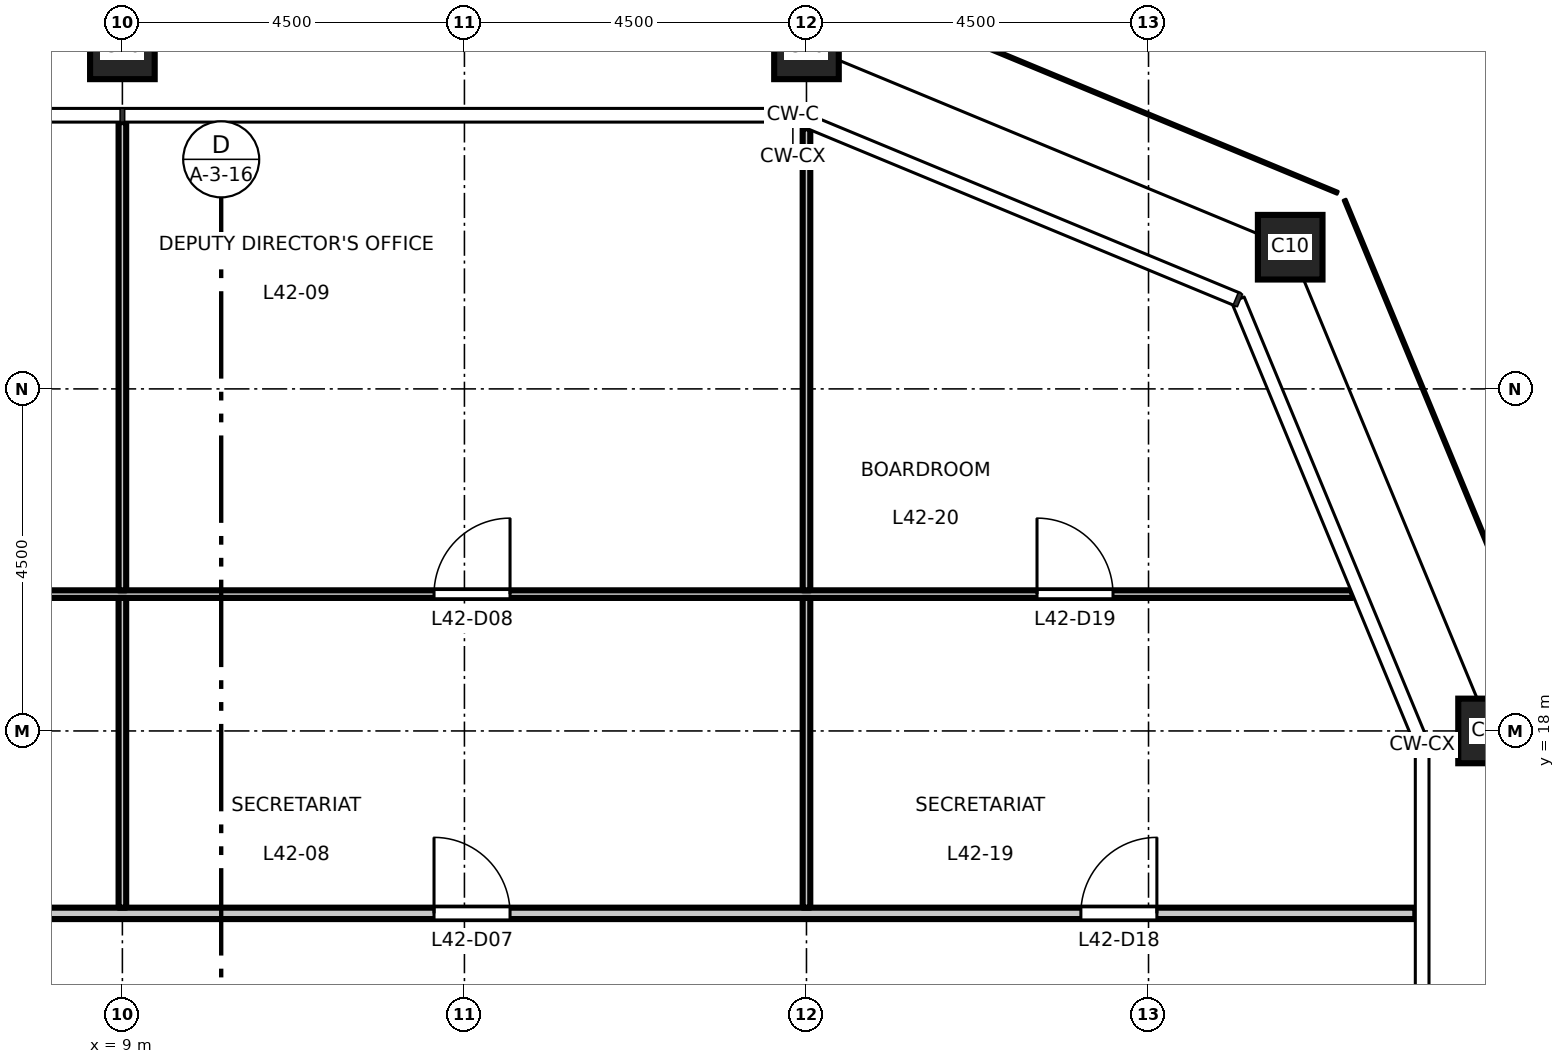
"""IFC4 building model, lengths in metres.
Left out: names, types, materials, properties, quantities, classifications, styles, units other than length and angle.
Written with IfcOpenShell. Run it as: python <this file> out.ifc"""

import sys

from ifc_helpers import new_model, si_unit, direction, frame, frame_2d, origin, origin_2d, place, context, subcontext, project, spatial, rectangle, hollow_rectangle, extrude, element, fill, save


model = new_model("IFC4")
c1 = context("Model", 3, precision=1e-05, world=origin(), true_north=direction((0.0, 1.0)))
c2 = subcontext(c1, "Body", "Model", "MODEL_VIEW")
j1 = project(units=[si_unit("LENGTHUNIT", "METRE"), si_unit("PLANEANGLEUNIT", "RADIAN")], contexts=[c1])
p1 = place(None, origin())
s1 = spatial("IfcSite", under=j1, at=p1, CompositionType="ELEMENT")
p2 = place(p1, origin())
s2 = spatial("IfcBuilding", under=s1, at=p2, CompositionType="ELEMENT")
p3 = place(p2, frame((0.0, 0.0, 197.2)))
s3 = spatial("IfcBuildingStorey", under=s2, at=p3, CompositionType="ELEMENT", Elevation=197.2)
for number, where, z_axis, x_axis in (
    (1, (27.0, 18.0, 0.0), (0.0, 0.0, 1.0), (1.0, 0.0, 0.0)),
    (2, (24.364, 24.364, 0.0), (0.0, 0.0, 1.0), (1.0, 0.0, 0.0)),
    (3, (18.0, 27.0, 0.0), (0.0, 0.0, 1.0), (1.0, 0.0, 0.0)),
    (4, (9.0, 27.0, 0.0), (0.0, 0.0, 1.0), (1.0, 0.0, 0.0)),
):
    element("IfcColumn", number, at=place(p3, frame(where, z_axis=z_axis, x_axis=x_axis)), inside=s3, PredefinedType="COLUMN", context=c2, shape_type="SweptSolid", body=[
        extrude(hollow_rectangle(XDim=0.85, YDim=0.85, WallThickness=0.05, at=origin_2d()), origin(), (0.0, 0.0, 1.0), 4.5),
    ])
p4 = place(p3, frame((-26.01, 15.6, 0.0), z_axis=(0.0, 0.0, 1.0), x_axis=(1.0, 0.0, 0.0)))
e5 = element("IfcWall", 5, at=p4, inside=s3, PredefinedType="PARTITIONING", context=c2, shape_type="SweptSolid", body=[
    extrude(rectangle(XDim=52.02, YDim=0.15, at=frame_2d((26.01, 0.0))), origin(), (0.0, 0.0, 1.0), 4.35),
])
p5 = place(p4, frame((12.11, 0.0, 0.0)))
e6 = element("IfcOpeningElement", 6, at=p5, cuts=e5, PredefinedType="OPENING", context=c2, shape_type="SweptSolid", body=[
    extrude(rectangle(XDim=1.0, YDim=2.1, at=frame_2d((0.5, 1.05))), frame((0.0, 0.085, 0.0), z_axis=(0.0, -1.0, 0.0), x_axis=(1.0, 0.0, 0.0)), (0.0, 0.0, 1.0), 0.17),
])
p6 = place(p4, frame((21.11, 0.0, 0.0)))
e7 = element("IfcOpeningElement", 7, at=p6, cuts=e5, PredefinedType="OPENING", context=c2, shape_type="SweptSolid", body=[
    extrude(rectangle(XDim=1.0, YDim=2.1, at=frame_2d((0.5, 1.05))), frame((0.0, 0.085, 0.0), z_axis=(0.0, -1.0, 0.0), x_axis=(1.0, 0.0, 0.0)), (0.0, 0.0, 1.0), 0.17),
])
p7 = place(p4, frame((27.86, 0.0, 0.0)))
e8 = element("IfcOpeningElement", 8, at=p7, cuts=e5, PredefinedType="OPENING", context=c2, shape_type="SweptSolid", body=[
    extrude(rectangle(XDim=1.0, YDim=2.1, at=frame_2d((0.5, 1.05))), frame((0.0, 0.085, 0.0), z_axis=(0.0, -1.0, 0.0), x_axis=(1.0, 0.0, 0.0)), (0.0, 0.0, 1.0), 0.17),
])
p8 = place(p4, frame((32.36, 0.0, 0.0)))
e9 = element("IfcOpeningElement", 9, at=p8, cuts=e5, PredefinedType="OPENING", context=c2, shape_type="SweptSolid", body=[
    extrude(rectangle(XDim=1.0, YDim=2.1, at=frame_2d((0.5, 1.05))), frame((0.0, 0.085, 0.0), z_axis=(0.0, -1.0, 0.0), x_axis=(1.0, 0.0, 0.0)), (0.0, 0.0, 1.0), 0.17),
])
p9 = place(p4, frame((39.11, 0.0, 0.0)))
e10 = element("IfcOpeningElement", 10, at=p9, cuts=e5, PredefinedType="OPENING", context=c2, shape_type="SweptSolid", body=[
    extrude(rectangle(XDim=1.0, YDim=2.1, at=frame_2d((0.5, 1.05))), frame((0.0, 0.085, 0.0), z_axis=(0.0, -1.0, 0.0), x_axis=(1.0, 0.0, 0.0)), (0.0, 0.0, 1.0), 0.17),
])
p10 = place(p4, frame((3.61, 0.0, 0.0)))
e11 = element("IfcOpeningElement", 11, at=p10, cuts=e5, PredefinedType="OPENING", context=c2, shape_type="SweptSolid", body=[
    extrude(rectangle(XDim=1.0, YDim=2.1, at=frame_2d((0.5, 1.05))), frame((0.0, 0.085, 0.0), z_axis=(0.0, -1.0, 0.0), x_axis=(1.0, 0.0, 0.0)), (0.0, 0.0, 1.0), 0.17),
])
p11 = place(p4, frame((47.62, 0.0, 0.0)))
e12 = element("IfcOpeningElement", 12, at=p11, cuts=e5, PredefinedType="OPENING", context=c2, shape_type="SweptSolid", body=[
    extrude(rectangle(XDim=1.0, YDim=2.1, at=frame_2d((0.5, 1.05))), frame((0.0, 0.085, 0.0), z_axis=(0.0, -1.0, 0.0), x_axis=(1.0, 0.0, 0.0)), (0.0, 0.0, 1.0), 0.17),
])
p12 = place(p3, frame((-8.95, 19.8, 0.0), z_axis=(0.0, 0.0, 1.0), x_axis=(1.0, 0.0, 0.0)))
e13 = element("IfcWall", 13, at=p12, inside=s3, PredefinedType="PARTITIONING", context=c2, shape_type="SweptSolid", body=[
    extrude(rectangle(XDim=34.133, YDim=0.1, at=frame_2d((17.066, 0.0))), origin(), (0.0, 0.0, 1.0), 4.35),
])
p13 = place(p12, frame((4.05, 0.0, 0.0)))
e14 = element("IfcOpeningElement", 14, at=p13, cuts=e13, PredefinedType="OPENING", context=c2, shape_type="SweptSolid", body=[
    extrude(rectangle(XDim=1.0, YDim=2.1, at=frame_2d((0.5, 1.05))), frame((0.0, 0.06, 0.0), z_axis=(0.0, -1.0, 0.0), x_axis=(1.0, 0.0, 0.0)), (0.0, 0.0, 1.0), 0.12),
])
p14 = place(p12, frame((10.8, 0.0, 0.0)))
e15 = element("IfcOpeningElement", 15, at=p14, cuts=e13, PredefinedType="OPENING", context=c2, shape_type="SweptSolid", body=[
    extrude(rectangle(XDim=1.0, YDim=2.1, at=frame_2d((0.5, 1.05))), frame((0.0, 0.06, 0.0), z_axis=(0.0, -1.0, 0.0), x_axis=(1.0, 0.0, 0.0)), (0.0, 0.0, 1.0), 0.12),
])
p15 = place(p12, frame((22.05, 0.0, 0.0)))
e16 = element("IfcOpeningElement", 16, at=p15, cuts=e13, PredefinedType="OPENING", context=c2, shape_type="SweptSolid", body=[
    extrude(rectangle(XDim=1.0, YDim=2.1, at=frame_2d((0.5, 1.05))), frame((0.0, 0.06, 0.0), z_axis=(0.0, -1.0, 0.0), x_axis=(1.0, 0.0, 0.0)), (0.0, 0.0, 1.0), 0.12),
])
p16 = place(p12, frame((29.983, 0.0, 0.0)))
e17 = element("IfcOpeningElement", 17, at=p16, cuts=e13, PredefinedType="OPENING", context=c2, shape_type="SweptSolid", body=[
    extrude(rectangle(XDim=1.0, YDim=2.1, at=frame_2d((0.5, 1.05))), frame((0.0, 0.06, 0.0), z_axis=(0.0, -1.0, 0.0), x_axis=(1.0, 0.0, 0.0)), (0.0, 0.0, 1.0), 0.12),
])
p17 = place(p3, frame((9.0, 15.675, 0.0), z_axis=(0.0, 0.0, 1.0), x_axis=(0.0, 1.0, 0.0)))
e18 = element("IfcWall", 18, at=p17, inside=s3, PredefinedType="PARTITIONING", context=c2, shape_type="SweptSolid", body=[
    extrude(rectangle(XDim=4.075, YDim=0.1, at=frame_2d((2.038, 0.0))), origin(), (0.0, 0.0, 1.0), 3.65),
])
p18 = place(p3, frame((9.0, 19.85, 0.0), z_axis=(0.0, 0.0, 1.0), x_axis=(0.0, 1.0, 0.0)))
e19 = element("IfcWall", 19, at=p18, inside=s3, PredefinedType="PARTITIONING", context=c2, shape_type="SweptSolid", body=[
    extrude(rectangle(XDim=6.16, YDim=0.1, at=frame_2d((3.08, 0.0))), origin(), (0.0, 0.0, 1.0), 3.65),
])
p19 = place(p3, frame((18.0, 15.675, 0.0), z_axis=(0.0, 0.0, 1.0), x_axis=(0.0, 1.0, 0.0)))
e20 = element("IfcWall", 20, at=p19, inside=s3, PredefinedType="PARTITIONING", context=c2, shape_type="SweptSolid", body=[
    extrude(rectangle(XDim=4.075, YDim=0.1, at=frame_2d((2.038, 0.0))), origin(), (0.0, 0.0, 1.0), 3.65),
])
p20 = place(p3, frame((18.0, 19.85, 0.0), z_axis=(0.0, 0.0, 1.0), x_axis=(0.0, 1.0, 0.0)))
e21 = element("IfcWall", 21, at=p20, inside=s3, PredefinedType="PARTITIONING", context=c2, shape_type="SweptSolid", body=[
    extrude(rectangle(XDim=6.078, YDim=0.1, at=frame_2d((3.039, 0.0))), origin(), (0.0, 0.0, 1.0), 3.65),
])
p21 = place(p9, origin())
e22 = element("IfcDoor", 22, at=p21, inside=s3, OperationType="SINGLE_SWING_LEFT", PredefinedType="DOOR", context=c2, shape_type="SweptSolid", body=[
    extrude(rectangle(XDim=1.0, YDim=2.1, at=frame_2d((0.5, 1.05))), frame((0.0, 0.025, 0.0), z_axis=(0.0, -1.0, 0.0), x_axis=(1.0, 0.0, 0.0)), (0.0, 0.0, 1.0), 0.05),
])
fill(e10, e22)
p22 = place(p15, origin())
e23 = element("IfcDoor", 23, at=p22, inside=s3, OperationType="SINGLE_SWING_RIGHT", PredefinedType="DOOR", context=c2, shape_type="SweptSolid", body=[
    extrude(rectangle(XDim=1.0, YDim=2.1, at=frame_2d((0.5, 1.05))), frame((0.0, 0.025, 0.0), z_axis=(0.0, -1.0, 0.0), x_axis=(1.0, 0.0, 0.0)), (0.0, 0.0, 1.0), 0.05),
])
fill(e16, e23)
p23 = place(p11, origin())
e24 = element("IfcDoor", 24, at=p23, inside=s3, OperationType="SINGLE_SWING_RIGHT", PredefinedType="DOOR", context=c2, shape_type="SweptSolid", body=[
    extrude(rectangle(XDim=1.0, YDim=2.1, at=frame_2d((0.5, 1.05))), frame((0.0, 0.025, 0.0), z_axis=(0.0, -1.0, 0.0), x_axis=(1.0, 0.0, 0.0)), (0.0, 0.0, 1.0), 0.05),
])
fill(e12, e24)
p24 = place(p16, origin())
e25 = element("IfcDoor", 25, at=p24, inside=s3, OperationType="SINGLE_SWING_LEFT", PredefinedType="DOOR", context=c2, shape_type="SweptSolid", body=[
    extrude(rectangle(XDim=1.0, YDim=2.1, at=frame_2d((0.5, 1.05))), frame((0.0, 0.025, 0.0), z_axis=(0.0, -1.0, 0.0), x_axis=(1.0, 0.0, 0.0)), (0.0, 0.0, 1.0), 0.05),
])
fill(e17, e25)
save(model, sys.argv[1])
